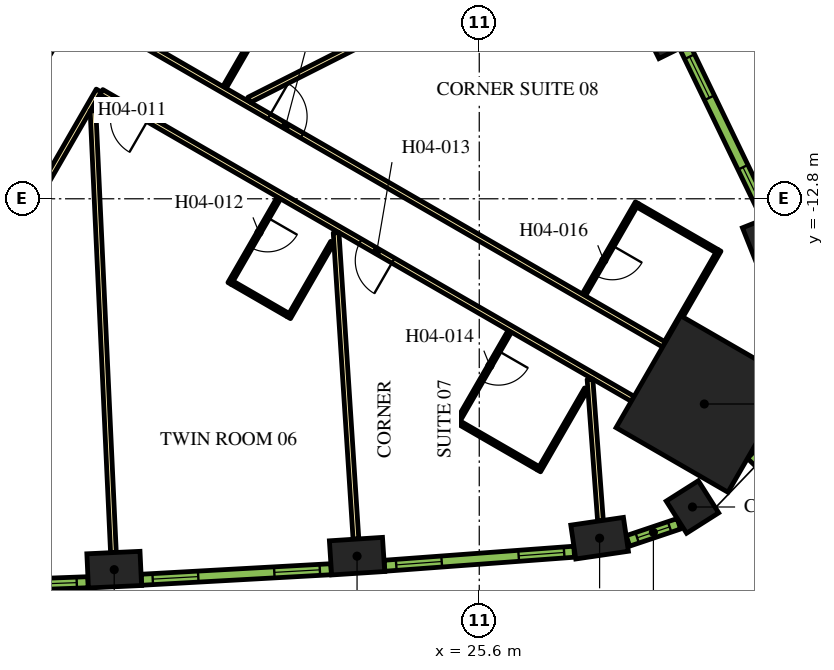
"""IFC4 building model, lengths in metres.
Left out: names, types, materials, properties, quantities, classifications, styles, units other than length and angle.
Written with IfcOpenShell. Run it as: python <this file> out.ifc"""

import sys

from ifc_helpers import new_model, si_unit, direction, frame, frame_2d, origin, origin_2d, place, context, subcontext, project, spatial, rectangle, extrude, element, fill, save


model = new_model("IFC4")
c1 = context("Model", 3, precision=1e-05, world=origin(), true_north=direction((0.0, 1.0)))
c2 = subcontext(c1, "Body", "Model", "MODEL_VIEW")
j1 = project(units=[si_unit("LENGTHUNIT", "METRE"), si_unit("PLANEANGLEUNIT", "RADIAN")], contexts=[c1])
p1 = place(None, origin())
s1 = spatial("IfcSite", under=j1, at=p1, CompositionType="ELEMENT")
p2 = place(p1, origin())
s2 = spatial("IfcBuilding", under=s1, at=p2, CompositionType="ELEMENT")
p3 = place(p2, frame((0.0, 0.0, 70.5)))
s3 = spatial("IfcBuildingStorey", under=s2, at=p3, CompositionType="ELEMENT", Elevation=70.5)
p4 = place(p3, frame((31.522, -18.199, 0.0), z_axis=(0.0, 0.0, 1.0), x_axis=(0.866025403784, -0.5, 0.0)))
e1 = element("IfcColumn", 1, at=p4, inside=s3, PredefinedType="COLUMN", context=c2, shape_type="SweptSolid", body=[
    extrude(rectangle(XDim=3.4, YDim=3.4, at=origin_2d()), origin(), (0.0, 0.0, 1.0), 3.9),
])
for number, where, z_axis, x_axis in (
    (2, (15.994, -22.558, 0.0), (0.0, 0.0, 1.0), (0.999, 0.046, 0.0)),
    (3, (22.385, -22.204, 0.0), (0.0, 0.0, 1.0), (0.998, 0.065, 0.0)),
    (4, (28.767, -21.731, 0.0), (0.0, 0.0, 1.0), (0.989, 0.145, 0.0)),
):
    element("IfcColumn", number, at=place(p3, frame(where, z_axis=z_axis, x_axis=x_axis)), inside=s3, PredefinedType="COLUMN", context=c2, shape_type="SweptSolid", body=[
        extrude(rectangle(XDim=1.4, YDim=0.9, at=origin_2d()), origin(), (0.0, 0.0, 1.0), 3.9),
    ])
p5 = place(p3, frame((31.21, -20.91, 0.0), z_axis=(0.0, 0.0, 1.0), x_axis=(0.844485001826, 0.535579202071, 0.0)))
e5 = element("IfcColumn", 5, at=p5, inside=s3, PredefinedType="COLUMN", context=c2, shape_type="SweptSolid", body=[
    extrude(rectangle(XDim=1.0, YDim=1.0, at=origin_2d()), origin(), (0.0, 0.0, 1.0), 3.9),
])
for number, where, z_axis, x_axis in (
    (6, (33.203, -14.047, 0.0), (0.0, 0.0, 1.0), (-0.369, 0.929, 0.0)),
    (7, (30.421, -8.284, 0.0), (0.0, 0.0, 1.0), (-0.443, 0.897, 0.0)),
):
    element("IfcColumn", number, at=place(p3, frame(where, z_axis=z_axis, x_axis=x_axis)), inside=s3, PredefinedType="COLUMN", context=c2, shape_type="SweptSolid", body=[
        extrude(rectangle(XDim=1.4, YDim=0.9, at=origin_2d()), origin(), (0.0, 0.0, 1.0), 3.9),
    ])
p6 = place(p3, frame((11.695, -12.644, 0.0), z_axis=(0.0, 0.0, 1.0), x_axis=(0.500010229568, 0.86601949766, 0.0)))
e8 = element("IfcWall", 8, at=p6, inside=s3, PredefinedType="SOLIDWALL", context=c2, shape_type="SweptSolid", body=[
    extrude(rectangle(XDim=9.326, YDim=0.9, at=frame_2d((4.663, 0.0))), origin(), (0.0, 0.0, 1.0), 3.9),
])
p7 = place(p3, frame((12.885, -9.431, 0.0), z_axis=(0.0, 0.0, 1.0), x_axis=(0.500020560727, 0.866013532718, 0.0)))
e9 = element("IfcWall", 9, at=p7, inside=s3, PredefinedType="SOLIDWALL", context=c2, shape_type="SweptSolid", body=[
    extrude(rectangle(XDim=3.45, YDim=0.25, at=frame_2d((1.725, 0.0))), origin(), (0.0, 0.0, 1.0), 3.9),
])
p8 = place(p3, frame((16.412, -8.523, 0.0), z_axis=(0.0, 0.0, 1.0), x_axis=(0.866022197818, -0.500005552856, 0.0)))
e10 = element("IfcWall", 10, at=p8, inside=s3, PredefinedType="PARTITIONING", context=c2, shape_type="SweptSolid", body=[
    extrude(rectangle(XDim=16.224, YDim=0.15, at=frame_2d((8.112, 0.0))), origin(), (0.0, 0.0, 1.0), 2.75),
])
p9 = place(p8, frame((4.223, 0.0, 0.0)))
e11 = element("IfcOpeningElement", 11, at=p9, cuts=e10, PredefinedType="OPENING", context=c2, shape_type="SweptSolid", body=[
    extrude(rectangle(XDim=1.0, YDim=2.1, at=frame_2d((0.5, 1.05))), frame((0.0, 0.085, 0.0), z_axis=(0.0, -1.0, 0.0), x_axis=(1.0, 0.0, 0.0)), (0.0, 0.0, 1.0), 0.17),
])
p10 = place(p3, frame((15.587, -9.952, 0.0), z_axis=(0.0, 0.0, 1.0), x_axis=(-0.500016618951, -0.866015808616, 0.0)))
e12 = element("IfcWall", 12, at=p10, inside=s3, PredefinedType="PARTITIONING", context=c2, shape_type="SweptSolid", body=[
    extrude(rectangle(XDim=5.268, YDim=0.15, at=frame_2d((2.634, 0.0))), origin(), (0.0, 0.0, 1.0), 2.75),
])
p11 = place(p3, frame((29.638, -18.064, 0.0), z_axis=(0.0, 0.0, 1.0), x_axis=(-0.866026175601, 0.499998663172, 0.0)))
e13 = element("IfcWall", 13, at=p11, inside=s3, PredefinedType="PARTITIONING", context=c2, shape_type="SweptSolid", body=[
    extrude(rectangle(XDim=16.144, YDim=0.15, at=frame_2d((8.072, 0.0))), origin(), (0.0, 0.0, 1.0), 2.75),
])
p12 = place(p11, frame((14.714, 0.0, 0.0)))
e14 = element("IfcOpeningElement", 14, at=p12, cuts=e13, PredefinedType="OPENING", context=c2, shape_type="SweptSolid", body=[
    extrude(rectangle(XDim=1.0, YDim=2.1, at=frame_2d((0.5, 1.05))), frame((0.0, 0.085, 0.0), z_axis=(0.0, -1.0, 0.0), x_axis=(1.0, 0.0, 0.0)), (0.0, 0.0, 1.0), 0.17),
])
p13 = place(p11, frame((7.275, 0.0, 0.0)))
e15 = element("IfcOpeningElement", 15, at=p13, cuts=e13, PredefinedType="OPENING", context=c2, shape_type="SweptSolid", body=[
    extrude(rectangle(XDim=1.0, YDim=2.1, at=frame_2d((0.5, 1.05))), frame((0.0, 0.085, 0.0), z_axis=(0.0, -1.0, 0.0), x_axis=(1.0, 0.0, 0.0)), (0.0, 0.0, 1.0), 0.17),
])
p14 = place(p3, frame((15.973, -22.109, 0.0), z_axis=(0.0, 0.0, 1.0), x_axis=(-0.046191717129, 0.998932592955, 0.0)))
e16 = element("IfcWall", 16, at=p14, inside=s3, PredefinedType="PARTITIONING", context=c2, shape_type="SweptSolid", body=[
    extrude(rectangle(XDim=11.638, YDim=0.15, at=frame_2d((5.819, 0.0))), origin(), (0.0, 0.0, 1.0), 2.75),
])
p15 = place(p3, frame((29.12, -5.356, 0.0), z_axis=(0.0, 0.0, 1.0), x_axis=(-0.892401965553, -0.451241323327, 0.0)))
e17 = element("IfcWall", 17, at=p15, inside=s3, PredefinedType="PARTITIONING", context=c2, shape_type="SweptSolid", body=[
    extrude(rectangle(XDim=10.729, YDim=0.15, at=frame_2d((5.364, 0.0))), origin(), (0.0, 0.0, 1.0), 2.75),
])
p16 = place(p3, frame((22.355, -21.754, 0.0), z_axis=(0.0, 0.0, 1.0), x_axis=(-0.064639533143, 0.997908678565, 0.0)))
e18 = element("IfcWall", 18, at=p16, inside=s3, PredefinedType="PARTITIONING", context=c2, shape_type="SweptSolid", body=[
    extrude(rectangle(XDim=8.079, YDim=0.15, at=frame_2d((4.04, 0.0))), origin(), (0.0, 0.0, 1.0), 2.75),
])
p17 = place(p3, frame((28.79, -21.273, 0.0), z_axis=(0.0, 0.0, 1.0), x_axis=(-0.07382592098, 0.997271143366, 0.0)))
e19 = element("IfcWall", 19, at=p17, inside=s3, PredefinedType="PARTITIONING", context=c2, shape_type="SweptSolid", body=[
    extrude(rectangle(XDim=3.734, YDim=0.15, at=frame_2d((1.867, 0.0))), origin(), (0.0, 0.0, 1.0), 2.75),
])
p18 = place(p3, frame((20.33, -12.777, 0.0), z_axis=(0.0, 0.0, 1.0), x_axis=(-0.500006934395, -0.866021400173, 0.0)))
e20 = element("IfcWall", 20, at=p18, inside=s3, PredefinedType="PARTITIONING", context=c2, shape_type="SweptSolid", body=[
    extrude(rectangle(XDim=2.6, YDim=0.1, at=frame_2d((1.3, 0.0))), origin(), (0.0, 0.0, 1.0), 2.75),
])
p19 = place(p18, frame((0.6, 0.0, 0.0)))
e21 = element("IfcOpeningElement", 21, at=p19, cuts=e20, PredefinedType="OPENING", context=c2, shape_type="SweptSolid", body=[
    extrude(rectangle(XDim=0.9, YDim=2.1, at=frame_2d((0.45, 1.05))), frame((0.0, 0.06, 0.0), z_axis=(0.0, -1.0, 0.0), x_axis=(1.0, 0.0, 0.0)), (0.0, 0.0, 1.0), 0.12),
])
p20 = place(p3, frame((19.098, -15.01, 0.0), z_axis=(0.0, 0.0, 1.0), x_axis=(0.86605165483, -0.499954529098, 0.0)))
e22 = element("IfcWall", 22, at=p20, inside=s3, PredefinedType="PARTITIONING", context=c2, shape_type="SweptSolid", body=[
    extrude(rectangle(XDim=1.7, YDim=0.1, at=frame_2d((0.85, 0.0))), origin(), (0.0, 0.0, 1.0), 2.75),
])
p21 = place(p3, frame((21.734, -13.945, 0.0), z_axis=(0.0, 0.0, 1.0), x_axis=(-0.500014693593, -0.866016920268, 0.0)))
e23 = element("IfcWall", 23, at=p21, inside=s3, PredefinedType="PARTITIONING", context=c2, shape_type="SweptSolid", body=[
    extrude(rectangle(XDim=2.29, YDim=0.1, at=frame_2d((1.145, 0.0))), origin(), (0.0, 0.0, 1.0), 2.75),
])
p22 = place(p3, frame((26.405, -16.284, 0.0), z_axis=(0.0, 0.0, 1.0), x_axis=(-0.49998411664, -0.866034573852, 0.0)))
e24 = element("IfcWall", 24, at=p22, inside=s3, PredefinedType="PARTITIONING", context=c2, shape_type="SweptSolid", body=[
    extrude(rectangle(XDim=2.8, YDim=0.1, at=frame_2d((1.4, 0.0))), origin(), (0.0, 0.0, 1.0), 2.75),
])
p23 = place(p22, frame((0.6, 0.0, 0.0)))
e25 = element("IfcOpeningElement", 25, at=p23, cuts=e24, PredefinedType="OPENING", context=c2, shape_type="SweptSolid", body=[
    extrude(rectangle(XDim=0.9, YDim=2.1, at=frame_2d((0.45, 1.05))), frame((0.0, 0.06, 0.0), z_axis=(0.0, -1.0, 0.0), x_axis=(1.0, 0.0, 0.0)), (0.0, 0.0, 1.0), 0.12),
])
p24 = place(p3, frame((25.073, -18.691, 0.0), z_axis=(0.0, 0.0, 1.0), x_axis=(0.866024647952, -0.500001309137, 0.0)))
e26 = element("IfcWall", 26, at=p24, inside=s3, PredefinedType="PARTITIONING", context=c2, shape_type="SweptSolid", body=[
    extrude(rectangle(XDim=2.4, YDim=0.1, at=frame_2d((1.2, 0.0))), origin(), (0.0, 0.0, 1.0), 2.75),
])
p25 = place(p3, frame((28.415, -17.802, 0.0), z_axis=(0.0, 0.0, 1.0), x_axis=(-0.499945955465, -0.866056604163, 0.0)))
e27 = element("IfcWall", 27, at=p25, inside=s3, PredefinedType="PARTITIONING", context=c2, shape_type="SweptSolid", body=[
    extrude(rectangle(XDim=2.49, YDim=0.1, at=frame_2d((1.245, 0.0))), origin(), (0.0, 0.0, 1.0), 2.75),
])
p26 = place(p3, frame((29.752, -12.905, 0.0), z_axis=(0.0, 0.0, 1.0), x_axis=(-0.500049511043, -0.865996816683, 0.0)))
e28 = element("IfcWall", 28, at=p26, inside=s3, PredefinedType="PARTITIONING", context=c2, shape_type="SweptSolid", body=[
    extrude(rectangle(XDim=2.8, YDim=0.1, at=frame_2d((1.4, 0.0))), origin(), (0.0, 0.0, 1.0), 2.75),
])
p27 = place(p26, frame((1.3, 0.0, 0.0)))
e29 = element("IfcOpeningElement", 29, at=p27, cuts=e28, PredefinedType="OPENING", context=c2, shape_type="SweptSolid", body=[
    extrude(rectangle(XDim=0.9, YDim=2.1, at=frame_2d((0.45, 1.05))), frame((0.0, 0.06, 0.0), z_axis=(0.0, -1.0, 0.0), x_axis=(1.0, 0.0, 0.0)), (0.0, 0.0, 1.0), 0.12),
])
p28 = place(p3, frame((29.771, -12.973, 0.0), z_axis=(0.0, 0.0, 1.0), x_axis=(0.865980596518, -0.500077600433, 0.0)))
e30 = element("IfcWall", 30, at=p28, inside=s3, PredefinedType="PARTITIONING", context=c2, shape_type="SweptSolid", body=[
    extrude(rectangle(XDim=2.4, YDim=0.1, at=frame_2d((1.2, 0.0))), origin(), (0.0, 0.0, 1.0), 2.75),
])
p29 = place(p3, frame((30.518, -16.58, 0.0), z_axis=(0.0, 0.0, 1.0), x_axis=(0.49998411664, 0.866034573852, 0.0)))
e31 = element("IfcWall", 31, at=p29, inside=s3, PredefinedType="PARTITIONING", context=c2, shape_type="SweptSolid", body=[
    extrude(rectangle(XDim=2.8, YDim=0.1, at=frame_2d((1.4, 0.0))), origin(), (0.0, 0.0, 1.0), 2.75),
])
p30 = place(p3, frame((20.109, -7.771, 0.0), z_axis=(0.0, 0.0, 1.0), x_axis=(-0.500077573772, -0.865980611914, 0.0)))
e32 = element("IfcWall", 32, at=p30, inside=s3, PredefinedType="PARTITIONING", context=c2, shape_type="SweptSolid", body=[
    extrude(rectangle(XDim=2.42, YDim=0.1, at=frame_2d((1.21, 0.0))), origin(), (0.0, 0.0, 1.0), 2.75),
])
p31 = place(p3, frame((10.31, -23.074, 0.0), z_axis=(0.0, 0.0, 1.0), x_axis=(0.999317974969, 0.036926750529, 0.0)))
e33 = element("IfcWall", 33, at=p31, inside=s3, PredefinedType="SOLIDWALL", context=c2, shape_type="SweptSolid", body=[
    extrude(rectangle(XDim=4.998, YDim=0.29, at=frame_2d((2.499, 0.0))), origin(), (0.0, 0.0, 1.0), 3.65),
])
p32 = place(p31, frame((0.297, 0.0, 0.9)))
e34 = element("IfcOpeningElement", 34, at=p32, cuts=e33, PredefinedType="OPENING", context=c2, shape_type="SweptSolid", body=[
    extrude(rectangle(XDim=1.2, YDim=2.15, at=frame_2d((0.6, 1.075))), frame((0.0, 0.155, 0.0), z_axis=(0.0, -1.0, 0.0), x_axis=(1.0, 0.0, 0.0)), (0.0, 0.0, 1.0), 0.31),
])
p33 = place(p31, frame((3.501, 0.0, 0.9)))
e35 = element("IfcOpeningElement", 35, at=p33, cuts=e33, PredefinedType="OPENING", context=c2, shape_type="SweptSolid", body=[
    extrude(rectangle(XDim=1.2, YDim=2.15, at=frame_2d((0.6, 1.075))), frame((0.0, 0.155, 0.0), z_axis=(0.0, -1.0, 0.0), x_axis=(1.0, 0.0, 0.0)), (0.0, 0.0, 1.0), 0.31),
])
p34 = place(p3, frame((16.711, -22.824, 0.0), z_axis=(0.0, 0.0, 1.0), x_axis=(0.998464708705, 0.055391564976, 0.0)))
e36 = element("IfcWall", 36, at=p34, inside=s3, PredefinedType="SOLIDWALL", context=c2, shape_type="SweptSolid", body=[
    extrude(rectangle(XDim=4.998, YDim=0.29, at=frame_2d((2.499, 0.0))), origin(), (0.0, 0.0, 1.0), 3.65),
])
p35 = place(p34, frame((0.297, 0.0, 0.9)))
e37 = element("IfcOpeningElement", 37, at=p35, cuts=e36, PredefinedType="OPENING", context=c2, shape_type="SweptSolid", body=[
    extrude(rectangle(XDim=1.2, YDim=2.15, at=frame_2d((0.6, 1.075))), frame((0.0, 0.155, 0.0), z_axis=(0.0, -1.0, 0.0), x_axis=(1.0, 0.0, 0.0)), (0.0, 0.0, 1.0), 0.31),
])
p36 = place(p34, frame((3.501, 0.0, 0.9)))
e38 = element("IfcOpeningElement", 38, at=p36, cuts=e36, PredefinedType="OPENING", context=c2, shape_type="SweptSolid", body=[
    extrude(rectangle(XDim=1.2, YDim=2.15, at=frame_2d((0.6, 1.075))), frame((0.0, 0.155, 0.0), z_axis=(0.0, -1.0, 0.0), x_axis=(1.0, 0.0, 0.0)), (0.0, 0.0, 1.0), 0.31),
])
p37 = place(p3, frame((23.106, -22.456, 0.0), z_axis=(0.0, 0.0, 1.0), x_axis=(0.997266290399, 0.073891447643, 0.0)))
e39 = element("IfcWall", 39, at=p37, inside=s3, PredefinedType="SOLIDWALL", context=c2, shape_type="SweptSolid", body=[
    extrude(rectangle(XDim=5.006, YDim=0.29, at=frame_2d((2.503, 0.0))), origin(), (0.0, 0.0, 1.0), 3.65),
])
p38 = place(p37, frame((0.31, 0.0, 0.9)))
e40 = element("IfcOpeningElement", 40, at=p38, cuts=e39, PredefinedType="OPENING", context=c2, shape_type="SweptSolid", body=[
    extrude(rectangle(XDim=1.2, YDim=2.15, at=frame_2d((0.6, 1.075))), frame((0.0, 0.155, 0.0), z_axis=(0.0, -1.0, 0.0), x_axis=(1.0, 0.0, 0.0)), (0.0, 0.0, 1.0), 0.31),
])
p39 = place(p37, frame((3.54, 0.0, 0.9)))
e41 = element("IfcOpeningElement", 41, at=p39, cuts=e39, PredefinedType="OPENING", context=c2, shape_type="SweptSolid", body=[
    extrude(rectangle(XDim=1.2, YDim=2.15, at=frame_2d((0.6, 1.075))), frame((0.0, 0.155, 0.0), z_axis=(0.0, -1.0, 0.0), x_axis=(1.0, 0.0, 0.0)), (0.0, 0.0, 1.0), 0.31),
])
p40 = place(p3, frame((29.512, -21.802, 0.0), z_axis=(0.0, 0.0, 1.0), x_axis=(0.947903891592, 0.318556450734, 0.0)))
e42 = element("IfcWall", 42, at=p40, inside=s3, PredefinedType="SOLIDWALL", context=c2, shape_type="SweptSolid", body=[
    extrude(rectangle(XDim=1.415, YDim=0.29, at=frame_2d((0.708, 0.0))), origin(), (0.0, 0.0, 1.0), 3.65),
])
p41 = place(p40, frame((0.257, 0.0, 0.9)))
e43 = element("IfcOpeningElement", 43, at=p41, cuts=e42, PredefinedType="OPENING", context=c2, shape_type="SweptSolid", body=[
    extrude(rectangle(XDim=0.9, YDim=2.15, at=frame_2d((0.45, 1.075))), frame((0.0, 0.155, 0.0), z_axis=(0.0, -1.0, 0.0), x_axis=(1.0, 0.0, 0.0)), (0.0, 0.0, 1.0), 0.31),
])
p42 = place(p3, frame((32.762, -19.732, 0.0), z_axis=(0.0, 0.0, 1.0), x_axis=(0.692252359589, 0.721655506903, 0.0)))
e44 = element("IfcWall", 44, at=p42, inside=s3, PredefinedType="SOLIDWALL", context=c2, shape_type="SweptSolid", body=[
    extrude(rectangle(XDim=0.764, YDim=0.29, at=frame_2d((0.382, 0.0))), origin(), (0.0, 0.0, 1.0), 3.65),
])
p43 = place(p3, frame((33.176, -13.29, 0.0), z_axis=(0.0, 0.0, 1.0), x_axis=(-0.434664499056, 0.900592456808, 0.0)))
e45 = element("IfcWall", 45, at=p43, inside=s3, PredefinedType="SOLIDWALL", context=c2, shape_type="SweptSolid", body=[
    extrude(rectangle(XDim=5.006, YDim=0.29, at=frame_2d((2.503, 0.0))), origin(), (0.0, 0.0, 1.0), 3.65),
])
p44 = place(p43, frame((0.265, 0.0, 0.9)))
e46 = element("IfcOpeningElement", 46, at=p44, cuts=e45, PredefinedType="OPENING", context=c2, shape_type="SweptSolid", body=[
    extrude(rectangle(XDim=1.2, YDim=2.15, at=frame_2d((0.6, 1.075))), frame((0.0, 0.155, 0.0), z_axis=(0.0, -1.0, 0.0), x_axis=(1.0, 0.0, 0.0)), (0.0, 0.0, 1.0), 0.31),
])
p45 = place(p43, frame((3.496, 0.0, 0.9)))
e47 = element("IfcOpeningElement", 47, at=p45, cuts=e45, PredefinedType="OPENING", context=c2, shape_type="SweptSolid", body=[
    extrude(rectangle(XDim=1.2, YDim=2.15, at=frame_2d((0.6, 1.075))), frame((0.0, 0.155, 0.0), z_axis=(0.0, -1.0, 0.0), x_axis=(1.0, 0.0, 0.0)), (0.0, 0.0, 1.0), 0.31),
])
p46 = place(p12, origin())
e48 = element("IfcDoor", 48, at=p46, inside=s3, OperationType="SINGLE_SWING_RIGHT", PredefinedType="DOOR", context=c2, shape_type="SweptSolid", body=[
    extrude(rectangle(XDim=1.0, YDim=2.1, at=frame_2d((0.5, 1.05))), frame((0.0, 0.025, 0.0), z_axis=(0.0, -1.0, 0.0), x_axis=(1.0, 0.0, 0.0)), (0.0, 0.0, 1.0), 0.05),
])
fill(e14, e48)
p47 = place(p19, origin())
e49 = element("IfcDoor", 49, at=p47, inside=s3, OperationType="SINGLE_SWING_RIGHT", PredefinedType="DOOR", context=c2, shape_type="SweptSolid", body=[
    extrude(rectangle(XDim=0.9, YDim=2.1, at=frame_2d((0.45, 1.05))), frame((0.0, 0.025, 0.0), z_axis=(0.0, -1.0, 0.0), x_axis=(1.0, 0.0, 0.0)), (0.0, 0.0, 1.0), 0.05),
])
fill(e21, e49)
p48 = place(p13, origin())
e50 = element("IfcDoor", 50, at=p48, inside=s3, OperationType="SINGLE_SWING_RIGHT", PredefinedType="DOOR", context=c2, shape_type="SweptSolid", body=[
    extrude(rectangle(XDim=1.0, YDim=2.1, at=frame_2d((0.5, 1.05))), frame((0.0, 0.025, 0.0), z_axis=(0.0, -1.0, 0.0), x_axis=(1.0, 0.0, 0.0)), (0.0, 0.0, 1.0), 0.05),
])
fill(e15, e50)
p49 = place(p23, origin())
e51 = element("IfcDoor", 51, at=p49, inside=s3, OperationType="SINGLE_SWING_LEFT", PredefinedType="DOOR", context=c2, shape_type="SweptSolid", body=[
    extrude(rectangle(XDim=0.9, YDim=2.1, at=frame_2d((0.45, 1.05))), frame((0.0, 0.025, 0.0), z_axis=(0.0, -1.0, 0.0), x_axis=(1.0, 0.0, 0.0)), (0.0, 0.0, 1.0), 0.05),
])
fill(e25, e51)
p50 = place(p9, origin())
e52 = element("IfcDoor", 52, at=p50, inside=s3, OperationType="SINGLE_SWING_LEFT", PredefinedType="DOOR", context=c2, shape_type="SweptSolid", body=[
    extrude(rectangle(XDim=1.0, YDim=2.1, at=frame_2d((0.5, 1.05))), frame((0.0, 0.025, 0.0), z_axis=(0.0, -1.0, 0.0), x_axis=(1.0, 0.0, 0.0)), (0.0, 0.0, 1.0), 0.05),
])
fill(e11, e52)
p51 = place(p27, origin())
e53 = element("IfcDoor", 53, at=p51, inside=s3, OperationType="SINGLE_SWING_LEFT", PredefinedType="DOOR", context=c2, shape_type="SweptSolid", body=[
    extrude(rectangle(XDim=0.9, YDim=2.1, at=frame_2d((0.45, 1.05))), frame((0.0, 0.025, 0.0), z_axis=(0.0, -1.0, 0.0), x_axis=(1.0, 0.0, 0.0)), (0.0, 0.0, 1.0), 0.05),
])
fill(e29, e53)
p52 = place(p33, origin())
e54 = element("IfcWindow", 54, at=p52, inside=s3, PartitioningType="DOUBLE_PANEL_VERTICAL", PredefinedType="WINDOW", context=c2, shape_type="SweptSolid", body=[
    extrude(rectangle(XDim=1.2, YDim=2.15, at=frame_2d((0.6, 1.075))), frame((0.0, 0.015, 0.0), z_axis=(0.0, -1.0, 0.0), x_axis=(1.0, 0.0, 0.0)), (0.0, 0.0, 1.0), 0.06),
])
fill(e35, e54)
p53 = place(p35, origin())
e55 = element("IfcWindow", 55, at=p53, inside=s3, PartitioningType="DOUBLE_PANEL_VERTICAL", PredefinedType="WINDOW", context=c2, shape_type="SweptSolid", body=[
    extrude(rectangle(XDim=1.2, YDim=2.15, at=frame_2d((0.6, 1.075))), frame((0.0, 0.015, 0.0), z_axis=(0.0, -1.0, 0.0), x_axis=(1.0, 0.0, 0.0)), (0.0, 0.0, 1.0), 0.06),
])
fill(e37, e55)
p54 = place(p36, origin())
e56 = element("IfcWindow", 56, at=p54, inside=s3, PartitioningType="DOUBLE_PANEL_VERTICAL", PredefinedType="WINDOW", context=c2, shape_type="SweptSolid", body=[
    extrude(rectangle(XDim=1.2, YDim=2.15, at=frame_2d((0.6, 1.075))), frame((0.0, 0.015, 0.0), z_axis=(0.0, -1.0, 0.0), x_axis=(1.0, 0.0, 0.0)), (0.0, 0.0, 1.0), 0.06),
])
fill(e38, e56)
p55 = place(p38, origin())
e57 = element("IfcWindow", 57, at=p55, inside=s3, PartitioningType="DOUBLE_PANEL_VERTICAL", PredefinedType="WINDOW", context=c2, shape_type="SweptSolid", body=[
    extrude(rectangle(XDim=1.2, YDim=2.15, at=frame_2d((0.6, 1.075))), frame((0.0, 0.015, 0.0), z_axis=(0.0, -1.0, 0.0), x_axis=(1.0, 0.0, 0.0)), (0.0, 0.0, 1.0), 0.06),
])
fill(e40, e57)
p56 = place(p39, origin())
e58 = element("IfcWindow", 58, at=p56, inside=s3, PartitioningType="DOUBLE_PANEL_VERTICAL", PredefinedType="WINDOW", context=c2, shape_type="SweptSolid", body=[
    extrude(rectangle(XDim=1.2, YDim=2.15, at=frame_2d((0.6, 1.075))), frame((0.0, 0.015, 0.0), z_axis=(0.0, -1.0, 0.0), x_axis=(1.0, 0.0, 0.0)), (0.0, 0.0, 1.0), 0.06),
])
fill(e41, e58)
p57 = place(p41, origin())
e59 = element("IfcWindow", 59, at=p57, inside=s3, PartitioningType="SINGLE_PANEL", PredefinedType="WINDOW", context=c2, shape_type="SweptSolid", body=[
    extrude(rectangle(XDim=0.9, YDim=2.15, at=frame_2d((0.45, 1.075))), frame((0.0, 0.015, 0.0), z_axis=(0.0, -1.0, 0.0), x_axis=(1.0, 0.0, 0.0)), (0.0, 0.0, 1.0), 0.06),
])
fill(e43, e59)
p58 = place(p44, origin())
e60 = element("IfcWindow", 60, at=p58, inside=s3, PartitioningType="DOUBLE_PANEL_VERTICAL", PredefinedType="WINDOW", context=c2, shape_type="SweptSolid", body=[
    extrude(rectangle(XDim=1.2, YDim=2.15, at=frame_2d((0.6, 1.075))), frame((0.0, 0.015, 0.0), z_axis=(0.0, -1.0, 0.0), x_axis=(1.0, 0.0, 0.0)), (0.0, 0.0, 1.0), 0.06),
])
fill(e46, e60)
p59 = place(p45, origin())
e61 = element("IfcWindow", 61, at=p59, inside=s3, PartitioningType="DOUBLE_PANEL_VERTICAL", PredefinedType="WINDOW", context=c2, shape_type="SweptSolid", body=[
    extrude(rectangle(XDim=1.2, YDim=2.15, at=frame_2d((0.6, 1.075))), frame((0.0, 0.015, 0.0), z_axis=(0.0, -1.0, 0.0), x_axis=(1.0, 0.0, 0.0)), (0.0, 0.0, 1.0), 0.06),
])
fill(e47, e61)
save(model, sys.argv[1])
